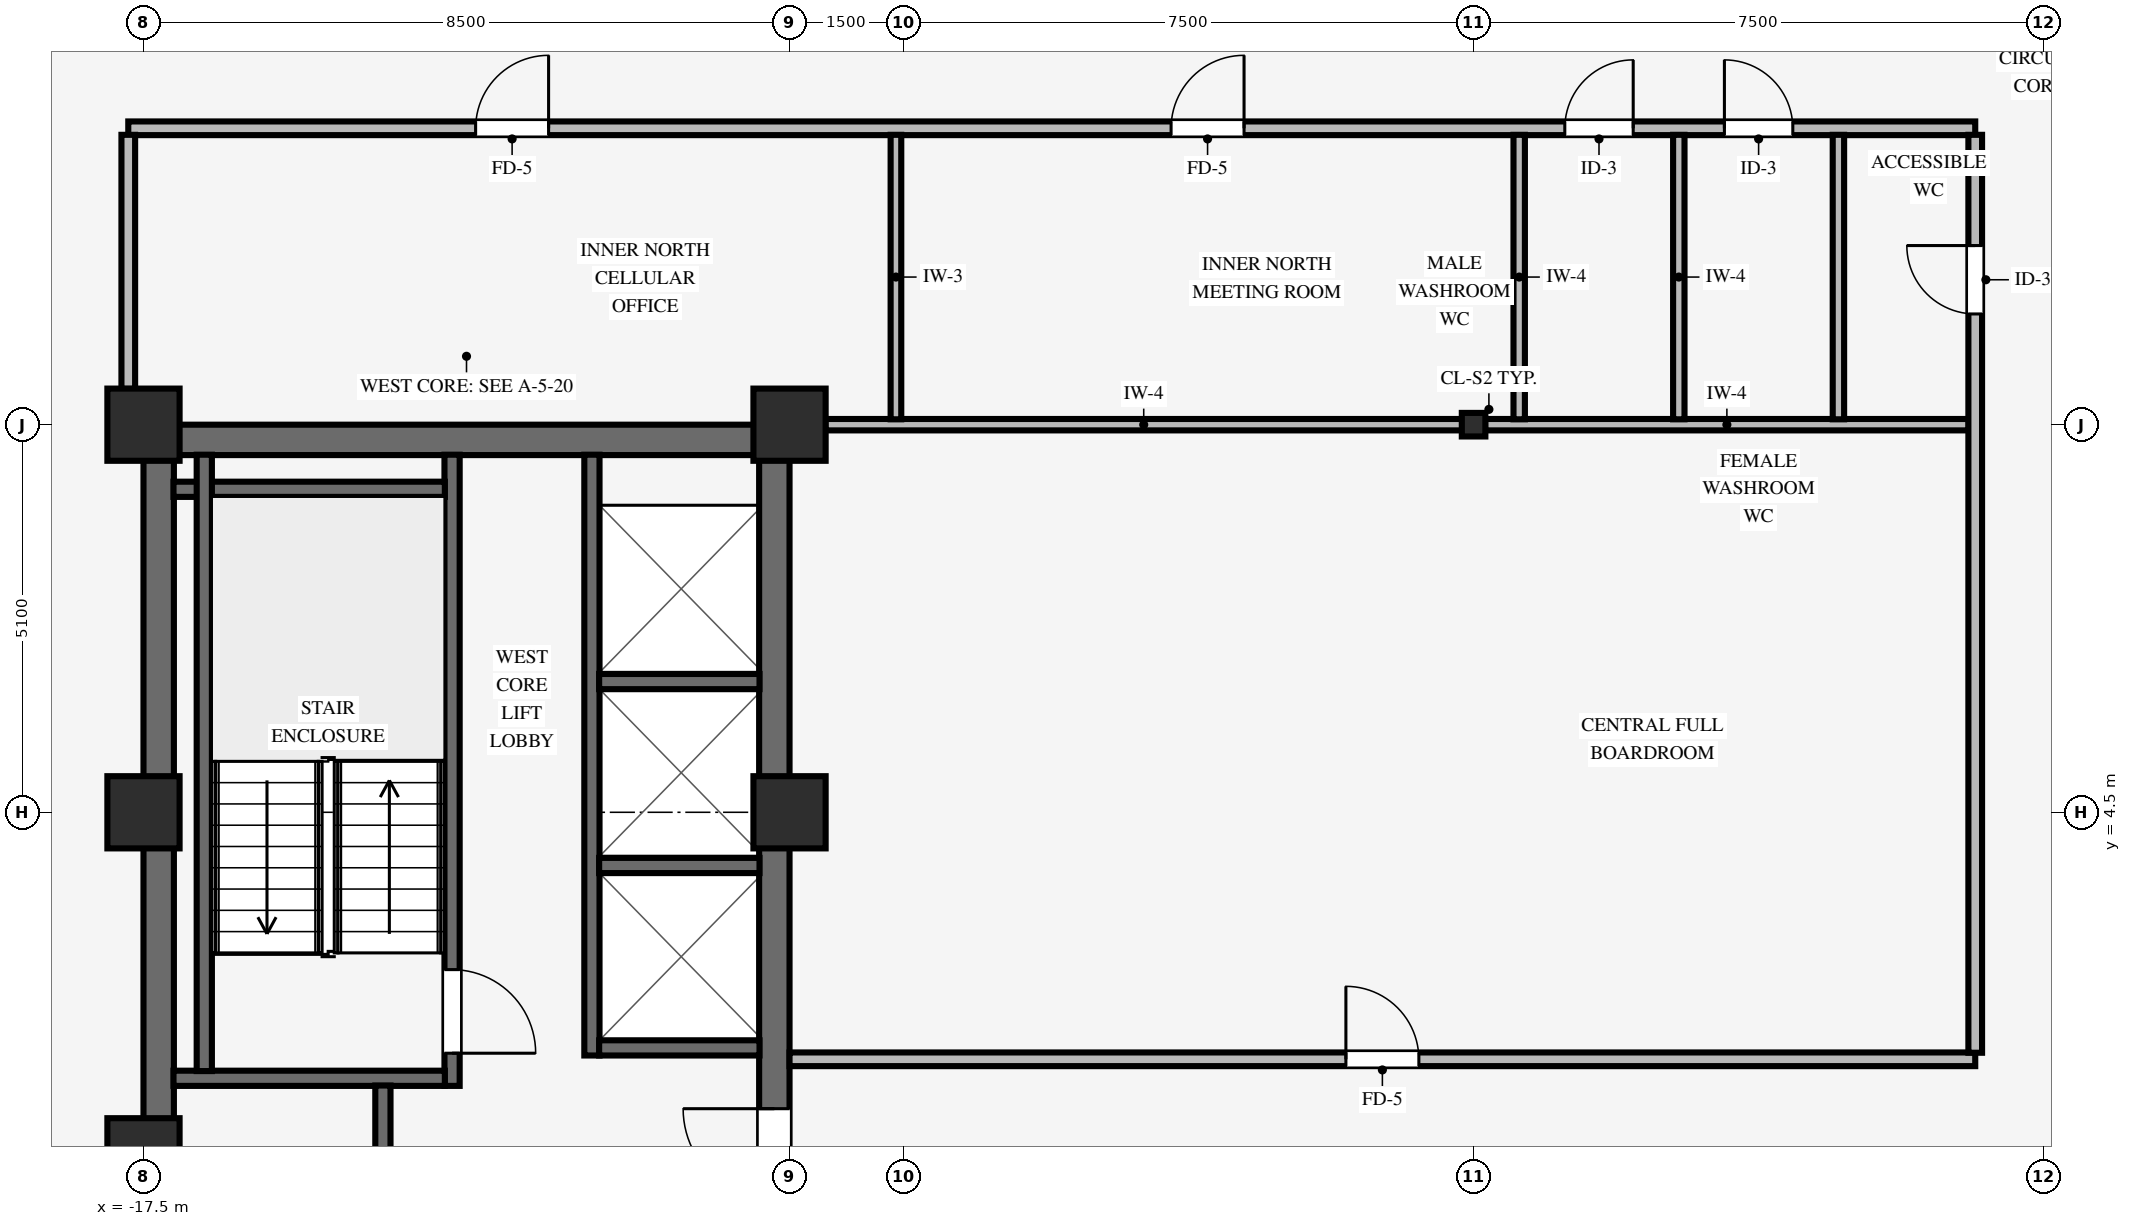
"""IFC4 building model, lengths in metres.
Left out: names, types, materials, properties, quantities, classifications, styles, units other than length and angle.
Written with IfcOpenShell. Run it as: python <this file> out.ifc"""

import sys

from ifc_helpers import new_model, si_unit, direction, frame, frame_2d, origin, origin_2d, place, context, subcontext, project, spatial, rectangle, i_section, extrude, source, transform, mapped, element, fill, save


model = new_model("IFC4")
c1 = context("Model", 3, precision=1e-05, world=origin(), true_north=direction((0.0, 1.0)))
c2 = subcontext(c1, "Body", "Model", "MODEL_VIEW")
j1 = project(units=[si_unit("LENGTHUNIT", "METRE"), si_unit("PLANEANGLEUNIT", "RADIAN")], contexts=[c1])
p1 = place(None, origin())
s1 = spatial("IfcSite", under=j1, at=p1, CompositionType="ELEMENT")
p2 = place(p1, origin())
s2 = spatial("IfcBuilding", under=s1, at=p2, CompositionType="ELEMENT")
p3 = place(p2, frame((0.0, 0.0, 171.3)))
s3 = spatial("IfcBuildingStorey", under=s2, at=p3, CompositionType="ELEMENT", Elevation=171.3)
p4 = place(p3, frame((-17.5, 9.4, 0.0), z_axis=(0.0, 0.0, 1.0), x_axis=(1.0, 0.0, 0.0)))
e1 = element("IfcWall", 1, at=p4, inside=s3, PredefinedType="SHEAR", context=c2, shape_type="SweptSolid", body=[
    extrude(rectangle(XDim=8.5, YDim=0.4, at=frame_2d((4.25, 0.0))), origin(), (0.0, 0.0, 1.0), 3.37),
])
p5 = place(p3, frame((-17.3, -9.205, 0.0), z_axis=(0.0, 0.0, 1.0), x_axis=(0.0, 1.0, 0.0)))
e2 = element("IfcWall", 2, at=p5, inside=s3, PredefinedType="SHEAR", context=c2, shape_type="SweptSolid", body=[
    extrude(rectangle(XDim=18.41, YDim=0.4, at=frame_2d((9.205, 0.0))), origin(), (0.0, 0.0, 1.0), 3.37),
])
p6 = place(p3, frame((-9.2, -9.205, 0.0), z_axis=(0.0, 0.0, 1.0), x_axis=(0.0, 1.0, 0.0)))
e3 = element("IfcWall", 3, at=p6, inside=s3, PredefinedType="SHEAR", context=c2, shape_type="SweptSolid", body=[
    extrude(rectangle(XDim=18.41, YDim=0.4, at=frame_2d((9.205, 0.0))), origin(), (0.0, 0.0, 1.0), 3.37),
])
p7 = place(p6, frame((8.605, 0.0, 0.0)))
e4 = element("IfcOpeningElement", 4, at=p7, cuts=e3, PredefinedType="OPENING", context=c2, shape_type="SweptSolid", body=[
    extrude(rectangle(XDim=1.2, YDim=2.15, at=frame_2d((0.6, 1.075))), frame((0.0, 0.21, 0.0), z_axis=(0.0, -1.0, 0.0), x_axis=(1.0, 0.0, 0.0)), (0.0, 0.0, 1.0), 0.42),
])
for number, where, z_axis, x_axis in (
    (5, (-17.5, 4.5, 0.0), (0.0, 0.0, 1.0), (1.0, 0.0, 0.0)),
    (6, (-17.5, 9.6, 0.0), (0.0, 0.0, 1.0), (1.0, 0.0, 0.0)),
    (7, (-9.0, 4.5, 0.0), (0.0, 0.0, 1.0), (1.0, 0.0, 0.0)),
    (8, (-9.0, 9.6, 0.0), (0.0, 0.0, 1.0), (1.0, 0.0, 0.0)),
    (9, (-17.5, 0.0, 0.0), (0.0, 0.0, 1.0), (1.0, 0.0, 0.0)),
):
    element("IfcColumn", number, at=place(p3, frame(where, z_axis=z_axis, x_axis=x_axis)), inside=s3, PredefinedType="COLUMN", context=c2, shape_type="SweptSolid", body=[
        extrude(rectangle(XDim=0.95, YDim=0.95, at=origin_2d()), origin(), (0.0, 0.0, 1.0), 3.37),
    ])
p8 = place(p3, frame((0.0, 9.6, 0.0), z_axis=(0.0, 0.0, 1.0), x_axis=(1.0, 0.0, 0.0)))
e10 = element("IfcColumn", 10, at=p8, inside=s3, PredefinedType="COLUMN", context=c2, shape_type="SweptSolid", body=[
    extrude(i_section(OverallWidth=0.31, OverallDepth=0.31, WebThickness=0.015, FlangeThickness=0.015, FilletRadius=0.015, at=origin_2d()), origin(), (0.0, 0.0, 1.0), 3.37),
])
p9 = place(p3, frame((-13.44, 0.9, 0.0), z_axis=(0.0, 0.0, 1.0), x_axis=(0.0, 1.0, 0.0)))
e11 = element("IfcWall", 11, at=p9, inside=s3, PredefinedType="SHEAR", context=c2, shape_type="SweptSolid", body=[
    extrude(rectangle(XDim=8.305, YDim=0.2, at=frame_2d((4.153, 0.0))), origin(), (0.0, 0.0, 1.0), 3.37),
])
p10 = place(p9, frame((1.53, 0.0, 0.0), z_axis=(0.0, 0.0, 1.0), x_axis=(-1.0, 0.0, 0.0)))
e12 = element("IfcOpeningElement", 12, at=p10, cuts=e11, PredefinedType="OPENING", context=c2, shape_type="SweptSolid", body=[
    extrude(rectangle(XDim=1.1, YDim=2.15, at=frame_2d((0.55, 1.075))), frame((0.0, 0.11, 0.0), z_axis=(0.0, -1.0, 0.0), x_axis=(1.0, 0.0, 0.0)), (0.0, 0.0, 1.0), 0.22),
])
for number, where, z_axis, x_axis in (
    (13, (-17.105, 1.0, 0.0), (0.0, 0.0, 1.0), (1.0, 0.0, 0.0)),
    (14, (-17.105, 8.75, 0.0), (0.0, 0.0, 1.0), (1.0, 0.0, 0.0)),
):
    element("IfcWall", number, at=place(p3, frame(where, z_axis=z_axis, x_axis=x_axis)), inside=s3, PredefinedType="SHEAR", context=c2, shape_type="SweptSolid", body=[
        extrude(rectangle(XDim=3.57, YDim=0.2, at=frame_2d((1.785, 0.0))), origin(), (0.0, 0.0, 1.0), 3.37),
    ])
p11 = place(p3, frame((-16.7, 1.095, 0.0), z_axis=(0.0, 0.0, 1.0), x_axis=(0.0, 1.0, 0.0)))
e15 = element("IfcWall", 15, at=p11, inside=s3, PredefinedType="SHEAR", context=c2, shape_type="SweptSolid", body=[
    extrude(rectangle(XDim=8.11, YDim=0.2, at=frame_2d((4.055, 0.0))), origin(), (0.0, 0.0, 1.0), 3.37),
])
p12 = place(p3, frame((-14.35, -6.2, 0.0), z_axis=(0.0, 0.0, 1.0), x_axis=(0.0, 1.0, 0.0)))
e16 = element("IfcWall", 16, at=p12, inside=s3, PredefinedType="SHEAR", context=c2, shape_type="SweptSolid", body=[
    extrude(rectangle(XDim=7.105, YDim=0.2, at=frame_2d((3.552, 0.0))), origin(), (0.0, 0.0, 1.0), 3.37),
])
p13 = place(p12, frame((5.69, 0.0, 0.0), z_axis=(0.0, 0.0, 1.0), x_axis=(-1.0, 0.0, 0.0)))
e17 = element("IfcOpeningElement", 17, at=p13, cuts=e16, PredefinedType="OPENING", context=c2, shape_type="SweptSolid", body=[
    extrude(rectangle(XDim=0.88, YDim=2.1, at=frame_2d((0.44, 1.05))), frame((0.0, 0.11, 0.0), z_axis=(0.0, -1.0, 0.0), x_axis=(1.0, 0.0, 0.0)), (0.0, 0.0, 1.0), 0.22),
])
p14 = place(p12, frame((1.15, 0.0, 0.0)))
e18 = element("IfcOpeningElement", 18, at=p14, cuts=e16, PredefinedType="OPENING", context=c2, shape_type="SweptSolid", body=[
    extrude(rectangle(XDim=1.3, YDim=2.2, at=frame_2d((0.65, 1.1))), frame((0.0, 0.11, 0.0), z_axis=(0.0, -1.0, 0.0), x_axis=(1.0, 0.0, 0.0)), (0.0, 0.0, 1.0), 0.22),
])
p15 = place(p3, frame((-11.6, 1.3, 0.0), z_axis=(0.0, 0.0, 1.0), x_axis=(0.0, 1.0, 0.0)))
e19 = element("IfcWall", 19, at=p15, inside=s3, PredefinedType="SHEAR", context=c2, shape_type="SweptSolid", body=[
    extrude(rectangle(XDim=7.905, YDim=0.2, at=frame_2d((3.953, 0.0))), origin(), (0.0, 0.0, 1.0), 3.37),
])
for number, where, z_axis, x_axis in (
    (20, (-11.505, 1.4, 0.0), (0.0, 0.0, 1.0), (1.0, 0.0, 0.0)),
    (21, (-11.505, 3.8, 0.0), (0.0, 0.0, 1.0), (1.0, 0.0, 0.0)),
    (22, (-11.505, 6.22, 0.0), (0.0, 0.0, 1.0), (1.0, 0.0, 0.0)),
):
    element("IfcWall", number, at=place(p3, frame(where, z_axis=z_axis, x_axis=x_axis)), inside=s3, PredefinedType="SHEAR", context=c2, shape_type="SweptSolid", body=[
        extrude(rectangle(XDim=2.11, YDim=0.2, at=frame_2d((1.055, 0.0))), origin(), (0.0, 0.0, 1.0), 3.37),
    ])
p16 = place(p3, frame((-9.0, 1.25, 0.0), z_axis=(0.0, 0.0, 1.0), x_axis=(1.0, 0.0, 0.0)))
e23 = element("IfcWall", 23, at=p16, inside=s3, PredefinedType="PARTITIONING", context=c2, shape_type="SweptSolid", body=[
    extrude(rectangle(XDim=15.6, YDim=0.18, at=frame_2d((7.8, 0.0))), origin(), (0.0, 0.0, 1.0), 3.36),
])
p17 = place(p16, frame((7.32, 0.0, 0.0)))
e24 = element("IfcOpeningElement", 24, at=p17, cuts=e23, PredefinedType="OPENING", context=c2, shape_type="SweptSolid", body=[
    extrude(rectangle(XDim=0.96, YDim=2.1, at=frame_2d((0.48, 1.05))), frame((0.0, 0.1, 0.0), z_axis=(0.0, -1.0, 0.0), x_axis=(1.0, 0.0, 0.0)), (0.0, 0.0, 1.0), 0.2),
])
p18 = place(p3, frame((-8.529, 9.6, 0.0), z_axis=(0.0, 0.0, 1.0), x_axis=(1.0, 0.0, 0.0)))
e25 = element("IfcWall", 25, at=p18, inside=s3, PredefinedType="PARTITIONING", context=c2, shape_type="SweptSolid", body=[
    extrude(rectangle(XDim=8.378, YDim=0.15, at=frame_2d((4.189, 0.0))), origin(), (0.0, 0.0, 1.0), 2.405),
])
p19 = place(p3, frame((0.151, 9.6, 0.0), z_axis=(0.0, 0.0, 1.0), x_axis=(1.0, 0.0, 0.0)))
e26 = element("IfcWall", 26, at=p19, inside=s3, PredefinedType="PARTITIONING", context=c2, shape_type="SweptSolid", body=[
    extrude(rectangle(XDim=6.363, YDim=0.15, at=frame_2d((3.182, 0.0))), origin(), (0.0, 0.0, 1.0), 2.405),
])
p20 = place(p3, frame((-17.7, 13.5, 0.0), z_axis=(0.0, 0.0, 1.0), x_axis=(1.0, 0.0, 0.0)))
e27 = element("IfcWall", 27, at=p20, inside=s3, PredefinedType="PARTITIONING", context=c2, shape_type="SweptSolid", body=[
    extrude(rectangle(XDim=24.3, YDim=0.18, at=frame_2d((12.15, 0.0))), origin(), (0.0, 0.0, 1.0), 3.008),
])
p21 = place(p20, frame((4.57, 0.0, 0.0)))
e28 = element("IfcOpeningElement", 28, at=p21, cuts=e27, PredefinedType="OPENING", context=c2, shape_type="SweptSolid", body=[
    extrude(rectangle(XDim=0.96, YDim=2.1, at=frame_2d((0.48, 1.05))), frame((0.0, 0.1, 0.0), z_axis=(0.0, -1.0, 0.0), x_axis=(1.0, 0.0, 0.0)), (0.0, 0.0, 1.0), 0.2),
])
p22 = place(p20, frame((13.72, 0.0, 0.0)))
e29 = element("IfcOpeningElement", 29, at=p22, cuts=e27, PredefinedType="OPENING", context=c2, shape_type="SweptSolid", body=[
    extrude(rectangle(XDim=0.96, YDim=2.1, at=frame_2d((0.48, 1.05))), frame((0.0, 0.1, 0.0), z_axis=(0.0, -1.0, 0.0), x_axis=(1.0, 0.0, 0.0)), (0.0, 0.0, 1.0), 0.2),
])
p23 = place(p20, frame((18.9, 0.0, 0.0)))
e30 = element("IfcOpeningElement", 30, at=p23, cuts=e27, PredefinedType="OPENING", context=c2, shape_type="SweptSolid", body=[
    extrude(rectangle(XDim=0.9, YDim=2.1, at=frame_2d((0.45, 1.05))), frame((0.0, 0.1, 0.0), z_axis=(0.0, -1.0, 0.0), x_axis=(1.0, 0.0, 0.0)), (0.0, 0.0, 1.0), 0.2),
])
p24 = place(p20, frame((21.0, 0.0, 0.0)))
e31 = element("IfcOpeningElement", 31, at=p24, cuts=e27, PredefinedType="OPENING", context=c2, shape_type="SweptSolid", body=[
    extrude(rectangle(XDim=0.9, YDim=2.1, at=frame_2d((0.45, 1.05))), frame((0.0, 0.1, 0.0), z_axis=(0.0, -1.0, 0.0), x_axis=(1.0, 0.0, 0.0)), (0.0, 0.0, 1.0), 0.2),
])
p25 = place(p3, frame((-17.7, 10.071, 0.0), z_axis=(0.0, 0.0, 1.0), x_axis=(0.0, 1.0, 0.0)))
e32 = element("IfcWall", 32, at=p25, inside=s3, PredefinedType="PARTITIONING", context=c2, shape_type="SweptSolid", body=[
    extrude(rectangle(XDim=3.343, YDim=0.18, at=frame_2d((1.671, 0.0))), origin(), (0.0, 0.0, 1.0), 2.816),
])
p26 = place(p3, frame((-7.6, 9.671, 0.0), z_axis=(0.0, 0.0, 1.0), x_axis=(0.0, 1.0, 0.0)))
e33 = element("IfcWall", 33, at=p26, inside=s3, PredefinedType="PARTITIONING", context=c2, shape_type="SweptSolid", body=[
    extrude(rectangle(XDim=3.743, YDim=0.14, at=frame_2d((1.872, 0.0))), origin(), (0.0, 0.0, 1.0), 3.36),
])
for number, where, z_axis, x_axis in (
    (34, (0.6, 9.671, 0.0), (0.0, 0.0, 1.0), (0.0, 1.0, 0.0)),
    (35, (2.7, 9.671, 0.0), (0.0, 0.0, 1.0), (0.0, 1.0, 0.0)),
    (36, (4.8, 9.671, 0.0), (0.0, 0.0, 1.0), (0.0, 1.0, 0.0)),
):
    element("IfcWall", number, at=place(p3, frame(where, z_axis=z_axis, x_axis=x_axis)), inside=s3, PredefinedType="PARTITIONING", context=c2, shape_type="SweptSolid", body=[
        extrude(rectangle(XDim=3.743, YDim=0.15, at=frame_2d((1.872, 0.0))), origin(), (0.0, 0.0, 1.0), 3.36),
    ])
p27 = place(p3, frame((6.6, 1.336, 0.0), z_axis=(0.0, 0.0, 1.0), x_axis=(0.0, 1.0, 0.0)))
e37 = element("IfcWall", 37, at=p27, inside=s3, PredefinedType="PARTITIONING", context=c2, shape_type="SweptSolid", body=[
    extrude(rectangle(XDim=12.078, YDim=0.18, at=frame_2d((6.039, 0.0))), origin(), (0.0, 0.0, 1.0), 3.36),
])
p28 = place(p27, frame((9.721, 0.0, 0.0)))
e38 = element("IfcOpeningElement", 38, at=p28, cuts=e37, PredefinedType="OPENING", context=c2, shape_type="SweptSolid", body=[
    extrude(rectangle(XDim=0.9, YDim=2.1, at=frame_2d((0.45, 1.05))), frame((0.0, 0.1, 0.0), z_axis=(0.0, -1.0, 0.0), x_axis=(1.0, 0.0, 0.0)), (0.0, 0.0, 1.0), 0.2),
])
m1 = source(origin(), c2, "Body", "SweptSolid", [
    extrude(rectangle(XDim=1.1, YDim=2.15, at=frame_2d((0.55, 1.075))), frame((0.0, 0.025, 0.0), z_axis=(0.0, -1.0, 0.0), x_axis=(1.0, 0.0, 0.0)), (0.0, 0.0, 1.0), 0.05),
])
p29 = place(p10, origin())
e39 = element("IfcDoor", 39, at=p29, inside=s3, OperationType="SINGLE_SWING_RIGHT", PredefinedType="DOOR", context=c2, shape_type="MappedRepresentation", body=[
    mapped(m1, transform((0.0, 0.0, 0.0), scale=1.0)),
])
fill(e12, e39)
m2 = source(origin(), c2, "Body", "SweptSolid", [
    extrude(rectangle(XDim=1.2, YDim=2.15, at=frame_2d((0.6, 1.075))), frame((0.0, 0.025, 0.0), z_axis=(0.0, -1.0, 0.0), x_axis=(1.0, 0.0, 0.0)), (0.0, 0.0, 1.0), 0.05),
])
p30 = place(p7, origin())
e40 = element("IfcDoor", 40, at=p30, inside=s3, OperationType="SINGLE_SWING_RIGHT", PredefinedType="DOOR", context=c2, shape_type="MappedRepresentation", body=[
    mapped(m2, transform((0.0, 0.0, 0.0), scale=1.0)),
])
fill(e4, e40)
m3 = source(origin(), c2, "Body", "SweptSolid", [
    extrude(rectangle(XDim=0.96, YDim=2.1, at=frame_2d((0.48, 1.05))), frame((0.0, 0.025, 0.0), z_axis=(0.0, -1.0, 0.0), x_axis=(1.0, 0.0, 0.0)), (0.0, 0.0, 1.0), 0.05),
])
p31 = place(p17, origin())
e41 = element("IfcDoor", 41, at=p31, inside=s3, OperationType="SINGLE_SWING_LEFT", PredefinedType="DOOR", context=c2, shape_type="MappedRepresentation", body=[
    mapped(m3, transform((0.0, 0.0, 0.0), scale=1.0)),
])
fill(e24, e41)
p32 = place(p21, origin())
e42 = element("IfcDoor", 42, at=p32, inside=s3, OperationType="SINGLE_SWING_RIGHT", PredefinedType="DOOR", context=c2, shape_type="MappedRepresentation", body=[
    mapped(m3, transform((0.0, 0.0, 0.0), scale=1.0)),
])
fill(e28, e42)
p33 = place(p22, origin())
e43 = element("IfcDoor", 43, at=p33, inside=s3, OperationType="SINGLE_SWING_RIGHT", PredefinedType="DOOR", context=c2, shape_type="MappedRepresentation", body=[
    mapped(m3, transform((0.0, 0.0, 0.0), scale=1.0)),
])
fill(e29, e43)
m4 = source(origin(), c2, "Body", "SweptSolid", [
    extrude(rectangle(XDim=0.9, YDim=2.1, at=frame_2d((0.45, 1.05))), frame((0.0, 0.025, 0.0), z_axis=(0.0, -1.0, 0.0), x_axis=(1.0, 0.0, 0.0)), (0.0, 0.0, 1.0), 0.05),
])
p34 = place(p28, origin())
e44 = element("IfcDoor", 44, at=p34, inside=s3, OperationType="SINGLE_SWING_RIGHT", PredefinedType="DOOR", context=c2, shape_type="MappedRepresentation", body=[
    mapped(m4, transform((0.0, 0.0, 0.0), scale=1.0)),
])
fill(e38, e44)
p35 = place(p23, origin())
e45 = element("IfcDoor", 45, at=p35, inside=s3, OperationType="SINGLE_SWING_RIGHT", PredefinedType="DOOR", context=c2, shape_type="MappedRepresentation", body=[
    mapped(m4, transform((0.0, 0.0, 0.0), scale=1.0)),
])
fill(e30, e45)
p36 = place(p24, origin())
e46 = element("IfcDoor", 46, at=p36, inside=s3, OperationType="SINGLE_SWING_LEFT", PredefinedType="DOOR", context=c2, shape_type="MappedRepresentation", body=[
    mapped(m4, transform((0.0, 0.0, 0.0), scale=1.0)),
])
fill(e31, e46)
save(model, sys.argv[1])
